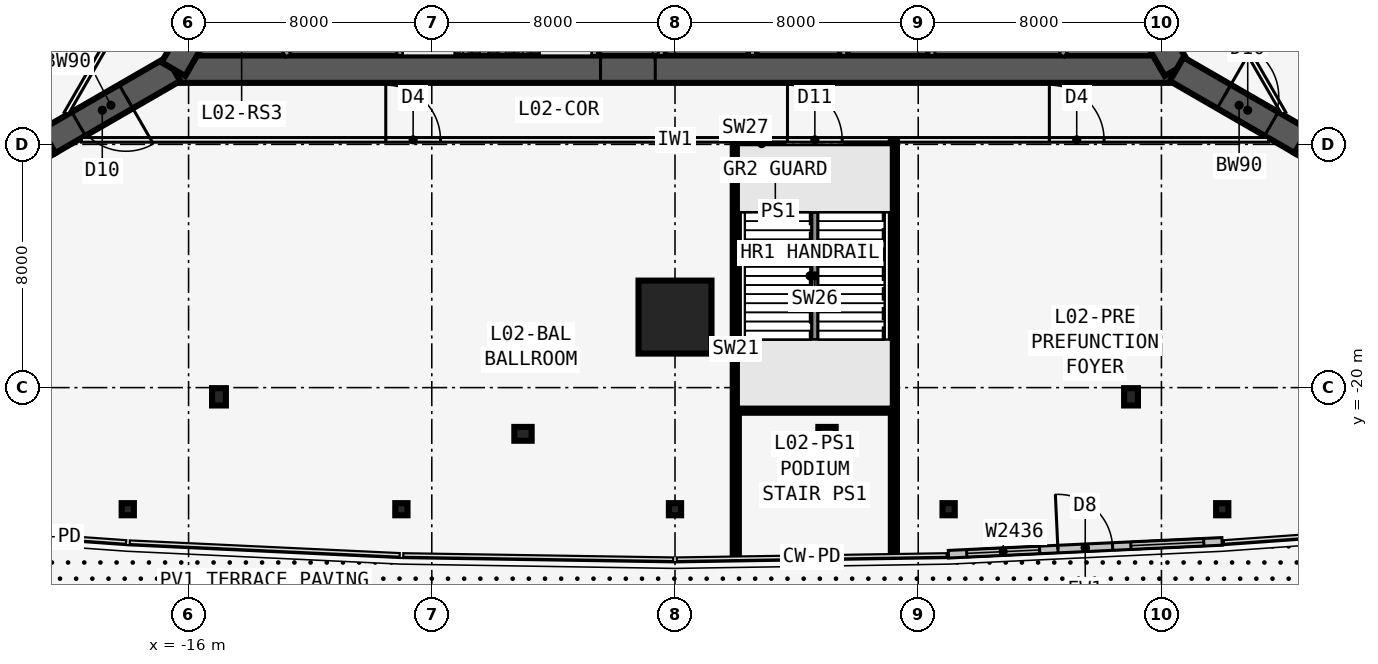
"""IFC4 building model, lengths in metres.
Left out: names, types, materials, properties, quantities, classifications, styles, units other than length and angle.
Written with IfcOpenShell. Run it as: python <this file> out.ifc"""

import sys

from ifc_helpers import new_model, si_unit, direction, frame, frame_2d, origin, origin_2d, place, context, subcontext, project, spatial, rectangle, i_section, extrude, element, fill, save


model = new_model("IFC4")
c1 = context("Model", 3, precision=1e-05, world=origin(), true_north=direction((0.0, 1.0)))
c2 = subcontext(c1, "Body", "Model", "MODEL_VIEW")
j1 = project(units=[si_unit("LENGTHUNIT", "METRE"), si_unit("PLANEANGLEUNIT", "RADIAN")], contexts=[c1])
p1 = place(None, origin())
s1 = spatial("IfcSite", under=j1, at=p1, CompositionType="ELEMENT")
p2 = place(p1, origin())
s2 = spatial("IfcBuilding", under=s1, at=p2, CompositionType="ELEMENT")
p3 = place(p2, frame((0.0, 0.0, 11.0)))
s3 = spatial("IfcBuildingStorey", under=s2, at=p3, CompositionType="ELEMENT", Elevation=11.0)
p4 = place(p3, frame((-16.5, -9.526, 0.0), z_axis=(0.0, 0.0, 1.0), x_axis=(1.0, 0.0, 0.0)))
e1 = element("IfcWall", 1, at=p4, inside=s3, PredefinedType="SHEAR", context=c2, shape_type="SweptSolid", body=[
    extrude(rectangle(XDim=33.0, YDim=0.9, at=frame_2d((16.5, 0.0))), origin(), (0.0, 0.0, 1.0), 6.5),
])
p5 = place(p4, frame((14.05, 0.0, 0.0)))
e2 = element("IfcOpeningElement", 2, at=p5, cuts=e1, PredefinedType="OPENING", context=c2, shape_type="SweptSolid", body=[
    extrude(rectangle(XDim=1.8, YDim=2.13, at=frame_2d((0.9, 1.065))), frame((0.0, 0.46, 0.0), z_axis=(0.0, -1.0, 0.0), x_axis=(1.0, 0.0, 0.0)), (0.0, 0.0, 1.0), 0.92),
])
p6 = place(p3, frame((-9.05, -5.951, 0.0), z_axis=(0.0, 0.0, 1.0), x_axis=(0.0, -1.0, 0.0)))
e3 = element("IfcWall", 3, at=p6, inside=s3, PredefinedType="SOLIDWALL", context=c2, shape_type="SweptSolid", body=[
    extrude(rectangle(XDim=3.125, YDim=0.2, at=frame_2d((1.562, 0.0))), origin(), (0.0, 0.0, 1.0), 6.25),
])
p7 = place(p3, frame((-2.65, -5.951, 0.0), z_axis=(0.0, 0.0, 1.0), x_axis=(0.0, -1.0, 0.0)))
e4 = element("IfcWall", 4, at=p7, inside=s3, PredefinedType="SOLIDWALL", context=c2, shape_type="SweptSolid", body=[
    extrude(rectangle(XDim=3.125, YDim=0.2, at=frame_2d((1.562, 0.0))), origin(), (0.0, 0.0, 1.0), 6.25),
])
p8 = place(p7, frame((1.525, 0.0, 0.0)))
e5 = element("IfcOpeningElement", 5, at=p8, cuts=e4, PredefinedType="OPENING", context=c2, shape_type="SweptSolid", body=[
    extrude(rectangle(XDim=1.0, YDim=2.13, at=frame_2d((0.5, 1.065))), frame((0.0, 0.11, 0.0), z_axis=(0.0, -1.0, 0.0), x_axis=(1.0, 0.0, 0.0)), (0.0, 0.0, 1.0), 0.22),
])
for number, where, z_axis, x_axis in (
    (6, (-0.45, -5.951, 0.0), (0.0, 0.0, 1.0), (0.0, -1.0, 0.0)),
    (7, (2.55, -5.951, 0.0), (0.0, 0.0, 1.0), (0.0, -1.0, 0.0)),
    (8, (5.55, -5.951, 0.0), (0.0, 0.0, 1.0), (0.0, -1.0, 0.0)),
    (9, (8.45, -5.951, 0.0), (0.0, 0.0, 1.0), (0.0, -1.0, 0.0)),
):
    element("IfcWall", number, at=place(p3, frame(where, z_axis=z_axis, x_axis=x_axis)), inside=s3, PredefinedType="SOLIDWALL", context=c2, shape_type="SweptSolid", body=[
        extrude(rectangle(XDim=3.125, YDim=0.2, at=frame_2d((1.562, 0.0))), origin(), (0.0, 0.0, 1.0), 6.25),
    ])
p9 = place(p3, frame((16.5, -9.526, 0.0), z_axis=(0.0, 0.0, 1.0), x_axis=(-0.499999749417, 0.866025548458, 0.0)))
e10 = element("IfcWall", 10, at=p9, inside=s3, PredefinedType="SHEAR", context=c2, shape_type="SweptSolid", body=[
    extrude(rectangle(XDim=33.0, YDim=0.9, at=frame_2d((16.5, 0.0))), origin(), (0.0, 0.0, 1.0), 6.5),
])
p10 = place(p9, frame((14.15, 0.0, 0.0)))
e11 = element("IfcOpeningElement", 11, at=p10, cuts=e10, PredefinedType="OPENING", context=c2, shape_type="SweptSolid", body=[
    extrude(rectangle(XDim=1.8, YDim=2.13, at=frame_2d((0.9, 1.065))), frame((0.0, 0.46, 0.0), z_axis=(0.0, -1.0, 0.0), x_axis=(1.0, 0.0, 0.0)), (0.0, 0.0, 1.0), 0.92),
])
p11 = place(p9, frame((12.6, 0.0, 0.0)))
e12 = element("IfcOpeningElement", 12, at=p11, cuts=e10, PredefinedType="OPENING", context=c2, shape_type="SweptSolid", body=[
    extrude(rectangle(XDim=1.0, YDim=2.13, at=frame_2d((0.5, 1.065))), frame((0.0, 0.46, 0.0), z_axis=(0.0, -1.0, 0.0), x_axis=(1.0, 0.0, 0.0)), (0.0, 0.0, 1.0), 0.92),
])
p12 = place(p3, frame((0.0, 19.052, 0.0), z_axis=(0.0, 0.0, 1.0), x_axis=(-0.499999749417, -0.866025548458, 0.0)))
e13 = element("IfcWall", 13, at=p12, inside=s3, PredefinedType="SHEAR", context=c2, shape_type="SweptSolid", body=[
    extrude(rectangle(XDim=33.0, YDim=0.9, at=frame_2d((16.5, 0.0))), origin(), (0.0, 0.0, 1.0), 6.5),
])
p13 = place(p12, frame((14.15, 0.0, 0.0)))
e14 = element("IfcOpeningElement", 14, at=p13, cuts=e13, PredefinedType="OPENING", context=c2, shape_type="SweptSolid", body=[
    extrude(rectangle(XDim=1.8, YDim=2.13, at=frame_2d((0.9, 1.065))), frame((0.0, 0.46, 0.0), z_axis=(0.0, -1.0, 0.0), x_axis=(1.0, 0.0, 0.0)), (0.0, 0.0, 1.0), 0.92),
])
p14 = place(p12, frame((12.6, 0.0, 0.0)))
e15 = element("IfcOpeningElement", 15, at=p14, cuts=e13, PredefinedType="OPENING", context=c2, shape_type="SweptSolid", body=[
    extrude(rectangle(XDim=1.0, YDim=2.13, at=frame_2d((0.5, 1.065))), frame((0.0, 0.46, 0.0), z_axis=(0.0, -1.0, 0.0), x_axis=(1.0, 0.0, 0.0)), (0.0, 0.0, 1.0), 0.92),
])
p15 = place(p3, frame((16.5, -9.526, 0.0), z_axis=(0.0, 0.0, 1.0), x_axis=(0.866031398331, -0.499989616998, 0.0)))
e16 = element("IfcWall", 16, at=p15, inside=s3, PredefinedType="SHEAR", context=c2, shape_type="SweptSolid", body=[
    extrude(rectangle(XDim=4.746, YDim=0.9, at=frame_2d((2.373, 0.0))), origin(), (0.0, 0.0, 1.0), 6.5),
])
p16 = place(p15, frame((1.8, 0.0, 0.0)))
e17 = element("IfcOpeningElement", 17, at=p16, cuts=e16, PredefinedType="OPENING", context=c2, shape_type="SweptSolid", body=[
    extrude(rectangle(XDim=1.8, YDim=2.13, at=frame_2d((0.9, 1.065))), frame((0.0, 0.46, 0.0), z_axis=(0.0, -1.0, 0.0), x_axis=(1.0, 0.0, 0.0)), (0.0, 0.0, 1.0), 0.92),
])
p17 = place(p3, frame((20.61, -11.899, 0.0), z_axis=(0.0, 0.0, 1.0), x_axis=(0.866009537788, -0.500027479704, 0.0)))
e18 = element("IfcWall", 18, at=p17, inside=s3, PredefinedType="SHEAR", context=c2, shape_type="SweptSolid", body=[
    extrude(rectangle(XDim=1.155, YDim=0.9, at=frame_2d((0.577, 0.0))), origin(), (0.0, 0.0, 1.0), 6.5),
])
p18 = place(p3, frame((-16.5, -9.526, 0.0), z_axis=(0.0, 0.0, 1.0), x_axis=(-0.866031398331, -0.499989616998, 0.0)))
e19 = element("IfcWall", 19, at=p18, inside=s3, PredefinedType="SHEAR", context=c2, shape_type="SweptSolid", body=[
    extrude(rectangle(XDim=4.746, YDim=0.9, at=frame_2d((2.373, 0.0))), origin(), (0.0, 0.0, 1.0), 6.5),
])
p19 = place(p18, frame((1.8, 0.0, 0.0)))
e20 = element("IfcOpeningElement", 20, at=p19, cuts=e19, PredefinedType="OPENING", context=c2, shape_type="SweptSolid", body=[
    extrude(rectangle(XDim=1.8, YDim=2.13, at=frame_2d((0.9, 1.065))), frame((0.0, 0.46, 0.0), z_axis=(0.0, -1.0, 0.0), x_axis=(1.0, 0.0, 0.0)), (0.0, 0.0, 1.0), 0.92),
])
p20 = place(p3, frame((-20.61, -11.899, 0.0), z_axis=(0.0, 0.0, 1.0), x_axis=(-0.866009537788, -0.500027479704, 0.0)))
e21 = element("IfcWall", 21, at=p20, inside=s3, PredefinedType="SHEAR", context=c2, shape_type="SweptSolid", body=[
    extrude(rectangle(XDim=1.155, YDim=0.9, at=frame_2d((0.577, 0.0))), origin(), (0.0, 0.0, 1.0), 6.5),
])
for number, where, z_axis, x_axis in (
    (22, (-15.0, -20.303, 0.0), (0.0, 0.0, 1.0), (1.0, 0.0, 0.0)),
    (23, (-5.0, -21.521, 0.0), (0.0, 0.0, 1.0), (0.0, -1.0, 0.0)),
    (24, (5.0, -21.521, 0.0), (0.0, 0.0, 1.0), (0.0, -1.0, 0.0)),
    (25, (15.0, -20.303, 0.0), (0.0, 0.0, 1.0), (1.0, 0.0, 0.0)),
):
    element("IfcColumn", number, at=place(p3, frame(where, z_axis=z_axis, x_axis=x_axis)), inside=s3, PredefinedType="COLUMN", context=c2, shape_type="SweptSolid", body=[
        extrude(i_section(OverallWidth=0.455, OverallDepth=0.569, WebThickness=0.078, FlangeThickness=0.125, at=origin_2d()), origin(), (0.0, 0.0, 1.0), 6.5),
    ])
for number, where, z_axis, x_axis in (
    (26, (-18.0, -24.0, 0.0), (0.0, 0.0, 1.0), (1.0, 0.0, 0.0)),
    (27, (-9.0, -24.0, 0.0), (0.0, 0.0, 1.0), (1.0, 0.0, 0.0)),
    (28, (0.0, -24.0, 0.0), (0.0, 0.0, 1.0), (1.0, 0.0, 0.0)),
    (29, (18.0, -24.0, 0.0), (0.0, 0.0, 1.0), (1.0, 0.0, 0.0)),
    (30, (9.0, -24.0, 0.0), (0.0, 0.0, 1.0), (1.0, 0.0, 0.0)),
):
    element("IfcColumn", number, at=place(p3, frame(where, z_axis=z_axis, x_axis=x_axis)), inside=s3, PredefinedType="COLUMN", context=c2, shape_type="SweptSolid", body=[
        extrude(i_section(OverallWidth=0.401, OverallDepth=0.399, WebThickness=0.025, FlangeThickness=0.04, at=origin_2d()), origin(), (0.0, 0.0, 1.0), 6.5),
    ])
p21 = place(p3, frame((0.0, -17.68, 0.0), z_axis=(0.0, 0.0, 1.0), x_axis=(0.0, -1.0, 0.0)))
e31 = element("IfcColumn", 31, at=p21, inside=s3, PredefinedType="COLUMN", context=c2, shape_type="SweptSolid", body=[
    extrude(rectangle(XDim=2.4, YDim=2.4, at=origin_2d()), origin(), (0.0, 0.0, 1.0), 6.5),
])
p22 = place(p3, frame((8.994, -25.48, 0.0), z_axis=(0.0, 0.0, 1.0), x_axis=(0.998899368932, 0.046904698557, 0.0)))
e32 = element("IfcWall", 32, at=p22, inside=s3, PredefinedType="STANDARD", context=c2, shape_type="SweptSolid", body=[
    extrude(rectangle(XDim=9.01, YDim=0.25, at=frame_2d((4.505, 0.0))), origin(), (0.0, 0.0, 1.0), 6.25),
])
p23 = place(p22, frame((3.605, 0.0, 0.0)))
e33 = element("IfcOpeningElement", 33, at=p23, cuts=e32, PredefinedType="OPENING", context=c2, shape_type="SweptSolid", body=[
    extrude(rectangle(XDim=1.8, YDim=2.4, at=frame_2d((0.9, 1.2))), frame((0.0, 0.135, 0.0), z_axis=(0.0, -1.0, 0.0), x_axis=(1.0, 0.0, 0.0)), (0.0, 0.0, 1.0), 0.27),
])
p24 = place(p22, frame((0.603, 0.0, 1.2)))
e34 = element("IfcOpeningElement", 34, at=p24, cuts=e32, PredefinedType="OPENING", context=c2, shape_type="SweptSolid", body=[
    extrude(rectangle(XDim=2.4, YDim=3.6, at=frame_2d((1.2, 1.8))), frame((0.0, 0.135, 0.0), z_axis=(0.0, -1.0, 0.0), x_axis=(1.0, 0.0, 0.0)), (0.0, 0.0, 1.0), 0.27),
])
p25 = place(p22, frame((6.007, 0.0, 1.2)))
e35 = element("IfcOpeningElement", 35, at=p25, cuts=e32, PredefinedType="OPENING", context=c2, shape_type="SweptSolid", body=[
    extrude(rectangle(XDim=2.4, YDim=3.6, at=frame_2d((1.2, 1.8))), frame((0.0, 0.135, 0.0), z_axis=(0.0, -1.0, 0.0), x_axis=(1.0, 0.0, 0.0)), (0.0, 0.0, 1.0), 0.27),
])
p26 = place(p3, frame((-19.527, -11.851, 0.0), z_axis=(0.0, 0.0, 1.0), x_axis=(1.0, 0.0, 0.0)))
e36 = element("IfcWall", 36, at=p26, inside=s3, PredefinedType="PARTITIONING", context=c2, shape_type="SweptSolid", body=[
    extrude(rectangle(XDim=39.054, YDim=0.15, at=frame_2d((19.527, 0.0))), origin(), (0.0, 0.0, 1.0), 5.308),
])
p27 = place(p26, frame((10.013, 0.0, 0.0)))
e37 = element("IfcOpeningElement", 37, at=p27, cuts=e36, PredefinedType="OPENING", context=c2, shape_type="SweptSolid", body=[
    extrude(rectangle(XDim=1.8, YDim=2.13, at=frame_2d((0.9, 1.065))), frame((0.0, 0.085, 0.0), z_axis=(0.0, -1.0, 0.0), x_axis=(1.0, 0.0, 0.0)), (0.0, 0.0, 1.0), 0.17),
])
p28 = place(p26, frame((23.227, 0.0, 0.0)))
e38 = element("IfcOpeningElement", 38, at=p28, cuts=e36, PredefinedType="OPENING", context=c2, shape_type="SweptSolid", body=[
    extrude(rectangle(XDim=1.8, YDim=2.13, at=frame_2d((0.9, 1.065))), frame((0.0, 0.085, 0.0), z_axis=(0.0, -1.0, 0.0), x_axis=(1.0, 0.0, 0.0)), (0.0, 0.0, 1.0), 0.17),
])
p29 = place(p26, frame((31.841, 0.0, 0.0)))
e39 = element("IfcOpeningElement", 39, at=p29, cuts=e36, PredefinedType="OPENING", context=c2, shape_type="SweptSolid", body=[
    extrude(rectangle(XDim=1.8, YDim=2.13, at=frame_2d((0.9, 1.065))), frame((0.0, 0.085, 0.0), z_axis=(0.0, -1.0, 0.0), x_axis=(1.0, 0.0, 0.0)), (0.0, 0.0, 1.0), 0.17),
])
p30 = place(p3, frame((2.0, -11.926, 0.0), z_axis=(0.0, 0.0, 1.0), x_axis=(0.0, -1.0, 0.0)))
e40 = element("IfcWall", 40, at=p30, inside=s3, PredefinedType="SHEAR", context=c2, shape_type="SweptSolid", body=[
    extrude(rectangle(XDim=13.607, YDim=0.2, at=frame_2d((6.804, 0.0))), origin(), (0.0, 0.0, 1.0), 6.5),
])
p31 = place(p3, frame((7.2, -11.926, 0.0), z_axis=(0.0, 0.0, 1.0), x_axis=(0.0, -1.0, 0.0)))
e41 = element("IfcWall", 41, at=p31, inside=s3, PredefinedType="SHEAR", context=c2, shape_type="SweptSolid", body=[
    extrude(rectangle(XDim=13.526, YDim=0.2, at=frame_2d((6.763, 0.0))), origin(), (0.0, 0.0, 1.0), 6.5),
])
p32 = place(p3, frame((20.027, -10.985, 0.0), z_axis=(0.0, 0.0, 1.0), x_axis=(-0.500001677587, 0.866024435227, 0.0)))
e42 = element("IfcWall", 42, at=p32, inside=s3, PredefinedType="PARTITIONING", context=c2, shape_type="SweptSolid", body=[
    extrude(rectangle(XDim=39.054, YDim=0.15, at=frame_2d((19.527, 0.0))), origin(), (0.0, 0.0, 1.0), 5.308),
])
p33 = place(p32, frame((10.013, 0.0, 0.0)))
e43 = element("IfcOpeningElement", 43, at=p33, cuts=e42, PredefinedType="OPENING", context=c2, shape_type="SweptSolid", body=[
    extrude(rectangle(XDim=1.8, YDim=2.13, at=frame_2d((0.9, 1.065))), frame((0.0, 0.085, 0.0), z_axis=(0.0, -1.0, 0.0), x_axis=(1.0, 0.0, 0.0)), (0.0, 0.0, 1.0), 0.17),
])
p34 = place(p32, frame((23.227, 0.0, 0.0)))
e44 = element("IfcOpeningElement", 44, at=p34, cuts=e42, PredefinedType="OPENING", context=c2, shape_type="SweptSolid", body=[
    extrude(rectangle(XDim=1.8, YDim=2.13, at=frame_2d((0.9, 1.065))), frame((0.0, 0.085, 0.0), z_axis=(0.0, -1.0, 0.0), x_axis=(1.0, 0.0, 0.0)), (0.0, 0.0, 1.0), 0.17),
])
p35 = place(p32, frame((27.627, 0.0, 0.0)))
e45 = element("IfcOpeningElement", 45, at=p35, cuts=e42, PredefinedType="OPENING", context=c2, shape_type="SweptSolid", body=[
    extrude(rectangle(XDim=1.0, YDim=2.13, at=frame_2d((0.5, 1.065))), frame((0.0, 0.085, 0.0), z_axis=(0.0, -1.0, 0.0), x_axis=(1.0, 0.0, 0.0)), (0.0, 0.0, 1.0), 0.17),
])
p36 = place(p32, frame((30.527, 0.0, 0.0)))
e46 = element("IfcOpeningElement", 46, at=p36, cuts=e42, PredefinedType="OPENING", context=c2, shape_type="SweptSolid", body=[
    extrude(rectangle(XDim=1.0, YDim=2.13, at=frame_2d((0.5, 1.065))), frame((0.0, 0.085, 0.0), z_axis=(0.0, -1.0, 0.0), x_axis=(1.0, 0.0, 0.0)), (0.0, 0.0, 1.0), 0.17),
])
p37 = place(p32, frame((33.277, 0.0, 0.0)))
e47 = element("IfcOpeningElement", 47, at=p37, cuts=e42, PredefinedType="OPENING", context=c2, shape_type="SweptSolid", body=[
    extrude(rectangle(XDim=1.0, YDim=2.13, at=frame_2d((0.5, 1.065))), frame((0.0, 0.085, 0.0), z_axis=(0.0, -1.0, 0.0), x_axis=(1.0, 0.0, 0.0)), (0.0, 0.0, 1.0), 0.17),
])
p38 = place(p32, frame((35.99, 0.0, 0.0)))
e48 = element("IfcOpeningElement", 48, at=p38, cuts=e42, PredefinedType="OPENING", context=c2, shape_type="SweptSolid", body=[
    extrude(rectangle(XDim=1.8, YDim=2.13, at=frame_2d((0.9, 1.065))), frame((0.0, 0.085, 0.0), z_axis=(0.0, -1.0, 0.0), x_axis=(1.0, 0.0, 0.0)), (0.0, 0.0, 1.0), 0.17),
])
p39 = place(p3, frame((-0.5, 22.836, 0.0), z_axis=(0.0, 0.0, 1.0), x_axis=(-0.500001677587, -0.866024435227, 0.0)))
e49 = element("IfcWall", 49, at=p39, inside=s3, PredefinedType="PARTITIONING", context=c2, shape_type="SweptSolid", body=[
    extrude(rectangle(XDim=39.054, YDim=0.15, at=frame_2d((19.527, 0.0))), origin(), (0.0, 0.0, 1.0), 5.308),
])
p40 = place(p39, frame((10.013, 0.0, 0.0)))
e50 = element("IfcOpeningElement", 50, at=p40, cuts=e49, PredefinedType="OPENING", context=c2, shape_type="SweptSolid", body=[
    extrude(rectangle(XDim=1.8, YDim=2.13, at=frame_2d((0.9, 1.065))), frame((0.0, 0.085, 0.0), z_axis=(0.0, -1.0, 0.0), x_axis=(1.0, 0.0, 0.0)), (0.0, 0.0, 1.0), 0.17),
])
p41 = place(p39, frame((23.227, 0.0, 0.0)))
e51 = element("IfcOpeningElement", 51, at=p41, cuts=e49, PredefinedType="OPENING", context=c2, shape_type="SweptSolid", body=[
    extrude(rectangle(XDim=1.8, YDim=2.13, at=frame_2d((0.9, 1.065))), frame((0.0, 0.085, 0.0), z_axis=(0.0, -1.0, 0.0), x_axis=(1.0, 0.0, 0.0)), (0.0, 0.0, 1.0), 0.17),
])
p42 = place(p39, frame((27.627, 0.0, 0.0)))
e52 = element("IfcOpeningElement", 52, at=p42, cuts=e49, PredefinedType="OPENING", context=c2, shape_type="SweptSolid", body=[
    extrude(rectangle(XDim=1.0, YDim=2.13, at=frame_2d((0.5, 1.065))), frame((0.0, 0.085, 0.0), z_axis=(0.0, -1.0, 0.0), x_axis=(1.0, 0.0, 0.0)), (0.0, 0.0, 1.0), 0.17),
])
p43 = place(p39, frame((30.277, 0.0, 0.0)))
e53 = element("IfcOpeningElement", 53, at=p43, cuts=e49, PredefinedType="OPENING", context=c2, shape_type="SweptSolid", body=[
    extrude(rectangle(XDim=1.0, YDim=2.13, at=frame_2d((0.5, 1.065))), frame((0.0, 0.085, 0.0), z_axis=(0.0, -1.0, 0.0), x_axis=(1.0, 0.0, 0.0)), (0.0, 0.0, 1.0), 0.17),
])
p44 = place(p39, frame((34.89, 0.0, 0.0)))
e54 = element("IfcOpeningElement", 54, at=p44, cuts=e49, PredefinedType="OPENING", context=c2, shape_type="SweptSolid", body=[
    extrude(rectangle(XDim=1.0, YDim=2.13, at=frame_2d((0.5, 1.065))), frame((0.0, 0.085, 0.0), z_axis=(0.0, -1.0, 0.0), x_axis=(1.0, 0.0, 0.0)), (0.0, 0.0, 1.0), 0.17),
])
for number, where, z_axis, x_axis in (
    (55, (14.219, -6.476, 0.0), (0.0, 0.0, 1.0), (-0.5, -0.866, 0.0)),
    (56, (-12.719, -9.076, 0.0), (0.0, 0.0, 1.0), (-0.5, 0.866, 0.0)),
):
    element("IfcWall", number, at=place(p3, frame(where, z_axis=z_axis, x_axis=x_axis)), inside=s3, PredefinedType="SOLIDWALL", context=c2, shape_type="SweptSolid", body=[
        extrude(rectangle(XDim=3.002, YDim=0.2, at=frame_2d((1.501, 0.0))), origin(), (0.0, 0.0, 1.0), 6.25),
    ])
p45 = place(p3, frame((2.0, -20.726, 0.0), z_axis=(0.0, 0.0, 1.0), x_axis=(1.0, 0.0, 0.0)))
e57 = element("IfcWall", 57, at=p45, inside=s3, PredefinedType="SHEAR", context=c2, shape_type="SweptSolid", body=[
    extrude(rectangle(XDim=5.2, YDim=0.2, at=frame_2d((2.6, 0.0))), origin(), (0.0, 0.0, 1.0), 6.5),
])
for number, where, z_axis, x_axis in (
    (58, (2.1, -11.976, 0.0), (0.0, 0.0, 1.0), (1.0, 0.0, 0.0)),
    (59, (5.6, -11.976, 0.0), (0.0, 0.0, 1.0), (1.0, 0.0, 0.0)),
):
    element("IfcWall", number, at=place(p3, frame(where, z_axis=z_axis, x_axis=x_axis)), inside=s3, PredefinedType="SOLIDWALL", context=c2, shape_type="SweptSolid", body=[
        extrude(rectangle(XDim=1.5, YDim=0.1, at=frame_2d((0.75, 0.0))), origin(), (0.0, 0.0, 1.0), 6.5),
    ])
p46 = place(p3, frame((4.6, -14.229, 0.0), z_axis=(0.0, 0.0, 1.0), x_axis=(0.0, -1.0, 0.0)))
e60 = element("IfcWall", 60, at=p46, inside=s3, PredefinedType="SOLIDWALL", context=c2, shape_type="SweptSolid", body=[
    extrude(rectangle(XDim=4.194, YDim=0.2, at=frame_2d((2.097, 0.0))), origin(), (0.0, 0.0, 1.0), 6.5),
])
p47 = place(p23, origin())
e61 = element("IfcDoor", 61, at=p47, inside=s3, OperationType="DOUBLE_DOOR_SINGLE_SWING", PredefinedType="DOOR", context=c2, shape_type="SweptSolid", body=[
    extrude(rectangle(XDim=1.8, YDim=2.4, at=frame_2d((0.9, 1.2))), frame((0.0, 0.025, 0.0), z_axis=(0.0, -1.0, 0.0), x_axis=(1.0, 0.0, 0.0)), (0.0, 0.0, 1.0), 0.05),
])
fill(e33, e61)
p48 = place(p24, origin())
e62 = element("IfcWindow", 62, at=p48, inside=s3, PartitioningType="SINGLE_PANEL", PredefinedType="WINDOW", context=c2, shape_type="SweptSolid", body=[
    extrude(rectangle(XDim=2.4, YDim=3.6, at=frame_2d((1.2, 1.8))), frame((0.0, 0.03, 0.0), z_axis=(0.0, -1.0, 0.0), x_axis=(1.0, 0.0, 0.0)), (0.0, 0.0, 1.0), 0.06),
])
fill(e34, e62)
p49 = place(p25, origin())
e63 = element("IfcWindow", 63, at=p49, inside=s3, PartitioningType="SINGLE_PANEL", PredefinedType="WINDOW", context=c2, shape_type="SweptSolid", body=[
    extrude(rectangle(XDim=2.4, YDim=3.6, at=frame_2d((1.2, 1.8))), frame((0.0, 0.03, 0.0), z_axis=(0.0, -1.0, 0.0), x_axis=(1.0, 0.0, 0.0)), (0.0, 0.0, 1.0), 0.06),
])
fill(e35, e63)
p50 = place(p27, origin())
e64 = element("IfcDoor", 64, at=p50, inside=s3, OperationType="DOUBLE_DOOR_SINGLE_SWING", PredefinedType="DOOR", context=c2, shape_type="SweptSolid", body=[
    extrude(rectangle(XDim=1.8, YDim=2.13, at=frame_2d((0.9, 1.065))), frame((0.0, 0.025, 0.0), z_axis=(0.0, -1.0, 0.0), x_axis=(1.0, 0.0, 0.0)), (0.0, 0.0, 1.0), 0.05),
])
fill(e37, e64)
p51 = place(p28, origin())
e65 = element("IfcDoor", 65, at=p51, inside=s3, OperationType="DOUBLE_DOOR_SINGLE_SWING", PredefinedType="DOOR", context=c2, shape_type="SweptSolid", body=[
    extrude(rectangle(XDim=1.8, YDim=2.13, at=frame_2d((0.9, 1.065))), frame((0.0, 0.025, 0.0), z_axis=(0.0, -1.0, 0.0), x_axis=(1.0, 0.0, 0.0)), (0.0, 0.0, 1.0), 0.05),
])
fill(e38, e65)
p52 = place(p29, origin())
e66 = element("IfcDoor", 66, at=p52, inside=s3, OperationType="DOUBLE_DOOR_SINGLE_SWING", PredefinedType="DOOR", context=c2, shape_type="SweptSolid", body=[
    extrude(rectangle(XDim=1.8, YDim=2.13, at=frame_2d((0.9, 1.065))), frame((0.0, 0.025, 0.0), z_axis=(0.0, -1.0, 0.0), x_axis=(1.0, 0.0, 0.0)), (0.0, 0.0, 1.0), 0.05),
])
fill(e39, e66)
p53 = place(p5, origin())
e67 = element("IfcDoor", 67, at=p53, inside=s3, OperationType="DOUBLE_DOOR_SINGLE_SWING", PredefinedType="DOOR", context=c2, shape_type="SweptSolid", body=[
    extrude(rectangle(XDim=1.8, YDim=2.13, at=frame_2d((0.9, 1.065))), frame((0.0, 0.025, 0.0), z_axis=(0.0, -1.0, 0.0), x_axis=(1.0, 0.0, 0.0)), (0.0, 0.0, 1.0), 0.05),
])
fill(e2, e67)
p54 = place(p16, origin())
e68 = element("IfcDoor", 68, at=p54, inside=s3, OperationType="DOUBLE_DOOR_DOUBLE_SWING", PredefinedType="DOOR", context=c2, shape_type="SweptSolid", body=[
    extrude(rectangle(XDim=1.8, YDim=2.13, at=frame_2d((0.9, 1.065))), frame((0.0, 0.025, 0.0), z_axis=(0.0, -1.0, 0.0), x_axis=(1.0, 0.0, 0.0)), (0.0, 0.0, 1.0), 0.05),
])
fill(e17, e68)
p55 = place(p19, origin())
e69 = element("IfcDoor", 69, at=p55, inside=s3, OperationType="DOUBLE_DOOR_DOUBLE_SWING", PredefinedType="DOOR", context=c2, shape_type="SweptSolid", body=[
    extrude(rectangle(XDim=1.8, YDim=2.13, at=frame_2d((0.9, 1.065))), frame((0.0, 0.025, 0.0), z_axis=(0.0, -1.0, 0.0), x_axis=(1.0, 0.0, 0.0)), (0.0, 0.0, 1.0), 0.05),
])
fill(e20, e69)
save(model, sys.argv[1])
